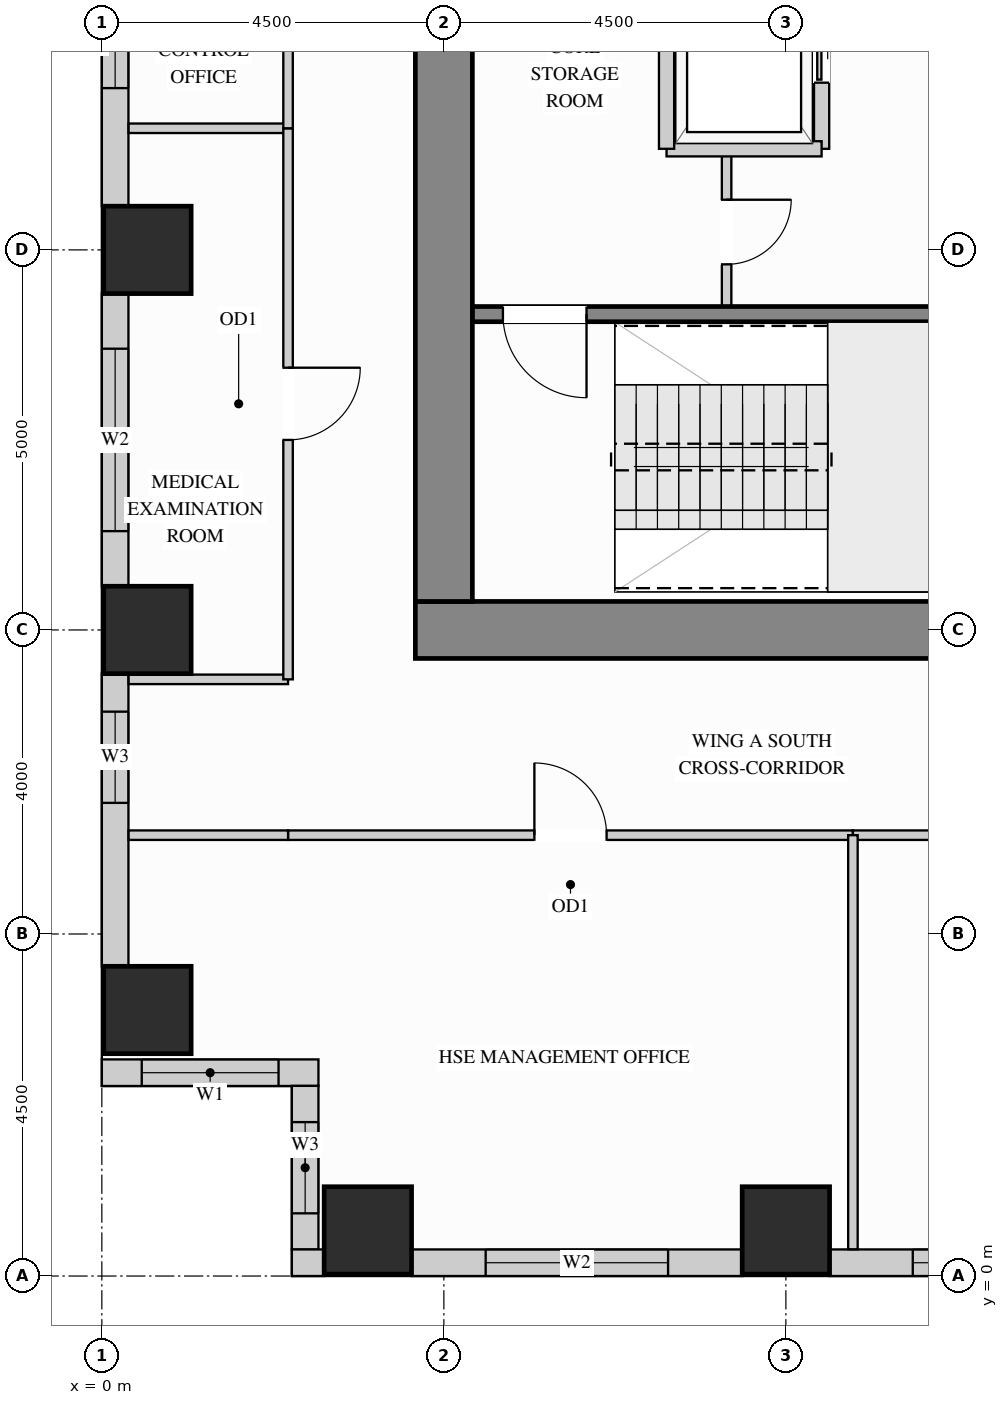
"""IFC4 building model, lengths in metres.
Left out: names, types, materials, properties, quantities, classifications, styles, units other than length and angle.
Written with IfcOpenShell. Run it as: python <this file> out.ifc"""

import sys

from ifc_helpers import new_model, si_unit, direction, frame, frame_2d, origin, origin_2d, place, context, subcontext, project, spatial, rectangle, extrude, source, transform, mapped, element, fill, save


model = new_model("IFC4")
c1 = context("Model", 3, precision=1e-05, world=origin(), true_north=direction((0.0, 1.0)))
c2 = subcontext(c1, "Body", "Model", "MODEL_VIEW")
j1 = project(units=[si_unit("LENGTHUNIT", "METRE"), si_unit("PLANEANGLEUNIT", "RADIAN")], contexts=[c1])
p1 = place(None, origin())
s1 = spatial("IfcSite", under=j1, at=p1, CompositionType="ELEMENT")
p2 = place(p1, origin())
s2 = spatial("IfcBuilding", under=s1, at=p2, CompositionType="ELEMENT")
p3 = place(p2, frame((0.0, 0.0, 117.0)))
s3 = spatial("IfcBuildingStorey", under=s2, at=p3, CompositionType="ELEMENT", Elevation=117.0)
m1 = source(origin(), c2, "Body", "SweptSolid", [
    extrude(rectangle(XDim=1.15, YDim=1.15, at=origin_2d()), origin(), (0.0, 0.0, 1.0), 3.38),
])
for number, where, z_axis, x_axis in (
    (1, (3.5, 0.6, 0.0), (0.0, 0.0, 1.0), (1.0, 0.0, 0.0)),
    (2, (9.0, 0.6, 0.0), (0.0, 0.0, 1.0), (1.0, 0.0, 0.0)),
    (3, (0.6, 13.5, 0.0), (0.0, 0.0, 1.0), (1.0, 0.0, 0.0)),
    (4, (0.6, 3.5, 0.0), (0.0, 0.0, 1.0), (1.0, 0.0, 0.0)),
    (5, (0.6, 8.5, 0.0), (0.0, 0.0, 1.0), (1.0, 0.0, 0.0)),
):
    element("IfcColumn", number, at=place(p3, frame(where, z_axis=z_axis, x_axis=x_axis)), inside=s3, PredefinedType="COLUMN", context=c2, shape_type="MappedRepresentation", body=[
        mapped(m1, transform((0.0, 0.0, 0.0), x_axis=(1.0, 0.0, 0.0), y_axis=(0.0, 1.0, 0.0), z_axis=(0.0, 0.0, 1.0))),
    ])
m2 = source(origin(), c2, "Body", "SweptSolid", [
    extrude(rectangle(XDim=10.75, YDim=0.75, at=frame_2d((5.375, 0.0))), origin(), (0.0, 0.0, 1.0), 3.38),
])
p4 = place(p3, frame((4.125, 8.5, 0.0), z_axis=(0.0, 0.0, 1.0), x_axis=(1.0, 0.0, 0.0)))
e6 = element("IfcWall", 6, at=p4, inside=s3, PredefinedType="SHEAR", context=c2, shape_type="MappedRepresentation", body=[
    mapped(m2, transform((0.0, 0.0, 0.0), x_axis=(1.0, 0.0, 0.0), y_axis=(0.0, 1.0, 0.0), z_axis=(0.0, 0.0, 1.0))),
])
m3 = source(origin(), c2, "Body", "SweptSolid", [
    extrude(rectangle(XDim=20.25, YDim=0.75, at=frame_2d((10.125, 0.0))), origin(), (0.0, 0.0, 1.0), 3.38),
])
p5 = place(p3, frame((4.5, 8.875, 0.0), z_axis=(0.0, 0.0, 1.0), x_axis=(0.0, 1.0, 0.0)))
e7 = element("IfcWall", 7, at=p5, inside=s3, PredefinedType="SHEAR", context=c2, shape_type="MappedRepresentation", body=[
    mapped(m3, transform((0.0, 0.0, 0.0), x_axis=(1.0, 0.0, 0.0), y_axis=(0.0, 1.0, 0.0), z_axis=(0.0, 0.0, 1.0))),
])
p6 = place(p3, frame((0.175, 17.427, 0.0), z_axis=(0.0, 0.0, 1.0), x_axis=(0.0, -1.0, 0.0)))
e8 = element("IfcWall", 8, at=p6, inside=s3, PredefinedType="SOLIDWALL", context=c2, shape_type="SweptSolid", body=[
    extrude(rectangle(XDim=3.354, YDim=0.35, at=frame_2d((1.677, 0.0))), origin(), (0.0, 0.0, 1.0), 3.365),
])
p7 = place(p6, frame((0.598, 0.0, 0.78)))
e9 = element("IfcOpeningElement", 9, at=p7, cuts=e8, PredefinedType="OPENING", context=c2, shape_type="SweptSolid", body=[
    extrude(rectangle(XDim=1.2, YDim=2.1, at=frame_2d((0.6, 1.05))), frame((0.0, 0.185, 0.0), z_axis=(0.0, -1.0, 0.0), x_axis=(1.0, 0.0, 0.0)), (0.0, 0.0, 1.0), 0.37),
])
p8 = place(p3, frame((0.175, 12.927, 0.0), z_axis=(0.0, 0.0, 1.0), x_axis=(0.0, -1.0, 0.0)))
e10 = element("IfcWall", 10, at=p8, inside=s3, PredefinedType="SOLIDWALL", context=c2, shape_type="SweptSolid", body=[
    extrude(rectangle(XDim=3.854, YDim=0.35, at=frame_2d((1.927, 0.0))), origin(), (0.0, 0.0, 1.0), 3.365),
])
p9 = place(p8, frame((0.727, 0.0, 0.78)))
e11 = element("IfcOpeningElement", 11, at=p9, cuts=e10, PredefinedType="OPENING", context=c2, shape_type="SweptSolid", body=[
    extrude(rectangle(XDim=2.4, YDim=2.1, at=frame_2d((1.2, 1.05))), frame((0.0, 0.185, 0.0), z_axis=(0.0, -1.0, 0.0), x_axis=(1.0, 0.0, 0.0)), (0.0, 0.0, 1.0), 0.37),
])
p10 = place(p3, frame((0.175, 7.927, 0.0), z_axis=(0.0, 0.0, 1.0), x_axis=(0.0, -1.0, 0.0)))
e12 = element("IfcWall", 12, at=p10, inside=s3, PredefinedType="SOLIDWALL", context=c2, shape_type="SweptSolid", body=[
    extrude(rectangle(XDim=3.854, YDim=0.35, at=frame_2d((1.927, 0.0))), origin(), (0.0, 0.0, 1.0), 3.365),
])
p11 = place(p10, frame((0.502, 0.0, 0.78)))
e13 = element("IfcOpeningElement", 13, at=p11, cuts=e12, PredefinedType="OPENING", context=c2, shape_type="SweptSolid", body=[
    extrude(rectangle(XDim=1.2, YDim=2.1, at=frame_2d((0.6, 1.05))), frame((0.0, 0.185, 0.0), z_axis=(0.0, -1.0, 0.0), x_axis=(1.0, 0.0, 0.0)), (0.0, 0.0, 1.0), 0.37),
])
p12 = place(p3, frame((0.0, 2.675, 0.0), z_axis=(0.0, 0.0, 1.0), x_axis=(1.0, 0.0, 0.0)))
e14 = element("IfcWall", 14, at=p12, inside=s3, PredefinedType="SOLIDWALL", context=c2, shape_type="SweptSolid", body=[
    extrude(rectangle(XDim=2.85, YDim=0.35, at=frame_2d((1.425, 0.0))), origin(), (0.0, 0.0, 1.0), 3.365),
])
p13 = place(p12, frame((0.525, 0.0, 0.78)))
e15 = element("IfcOpeningElement", 15, at=p13, cuts=e14, PredefinedType="OPENING", context=c2, shape_type="SweptSolid", body=[
    extrude(rectangle(XDim=1.8, YDim=2.1, at=frame_2d((0.9, 1.05))), frame((0.0, 0.185, 0.0), z_axis=(0.0, -1.0, 0.0), x_axis=(1.0, 0.0, 0.0)), (0.0, 0.0, 1.0), 0.37),
])
p14 = place(p3, frame((2.675, 2.502, 0.0), z_axis=(0.0, 0.0, 1.0), x_axis=(0.0, -1.0, 0.0)))
e16 = element("IfcWall", 16, at=p14, inside=s3, PredefinedType="SOLIDWALL", context=c2, shape_type="SweptSolid", body=[
    extrude(rectangle(XDim=2.154, YDim=0.35, at=frame_2d((1.077, 0.0))), origin(), (0.0, 0.0, 1.0), 3.365),
])
p15 = place(p14, frame((0.477, 0.0, 0.78)))
e17 = element("IfcOpeningElement", 17, at=p15, cuts=e16, PredefinedType="OPENING", context=c2, shape_type="SweptSolid", body=[
    extrude(rectangle(XDim=1.2, YDim=2.1, at=frame_2d((0.6, 1.05))), frame((0.0, 0.185, 0.0), z_axis=(0.0, -1.0, 0.0), x_axis=(1.0, 0.0, 0.0)), (0.0, 0.0, 1.0), 0.37),
])
m4 = source(origin(), c2, "Body", "SweptSolid", [
    extrude(rectangle(XDim=0.427, YDim=0.35, at=frame_2d((0.213, 0.0))), origin(), (0.0, 0.0, 1.0), 3.365),
])
p16 = place(p3, frame((2.5, 0.175, 0.0), z_axis=(0.0, 0.0, 1.0), x_axis=(1.0, 0.0, 0.0)))
e18 = element("IfcWall", 18, at=p16, inside=s3, PredefinedType="SOLIDWALL", context=c2, shape_type="MappedRepresentation", body=[
    mapped(m4, transform((0.0, 0.0, 0.0), x_axis=(1.0, 0.0, 0.0), y_axis=(0.0, 1.0, 0.0), z_axis=(0.0, 0.0, 1.0))),
])
p17 = place(p3, frame((4.073, 0.175, 0.0), z_axis=(0.0, 0.0, 1.0), x_axis=(1.0, 0.0, 0.0)))
e19 = element("IfcWall", 19, at=p17, inside=s3, PredefinedType="SOLIDWALL", context=c2, shape_type="SweptSolid", body=[
    extrude(rectangle(XDim=4.354, YDim=0.35, at=frame_2d((2.177, 0.0))), origin(), (0.0, 0.0, 1.0), 3.365),
])
p18 = place(p17, frame((0.977, 0.0, 0.78)))
e20 = element("IfcOpeningElement", 20, at=p18, cuts=e19, PredefinedType="OPENING", context=c2, shape_type="SweptSolid", body=[
    extrude(rectangle(XDim=2.4, YDim=2.1, at=frame_2d((1.2, 1.05))), frame((0.0, 0.185, 0.0), z_axis=(0.0, -1.0, 0.0), x_axis=(1.0, 0.0, 0.0)), (0.0, 0.0, 1.0), 0.37),
])
p19 = place(p3, frame((9.573, 0.175, 0.0), z_axis=(0.0, 0.0, 1.0), x_axis=(1.0, 0.0, 0.0)))
e21 = element("IfcWall", 21, at=p19, inside=s3, PredefinedType="SOLIDWALL", context=c2, shape_type="SweptSolid", body=[
    extrude(rectangle(XDim=4.354, YDim=0.35, at=frame_2d((2.177, 0.0))), origin(), (0.0, 0.0, 1.0), 3.365),
])
p20 = place(p19, frame((1.096, 0.0, 0.78)))
e22 = element("IfcOpeningElement", 22, at=p20, cuts=e21, PredefinedType="OPENING", context=c2, shape_type="SweptSolid", body=[
    extrude(rectangle(XDim=2.4, YDim=2.1, at=frame_2d((1.2, 1.05))), frame((0.0, 0.185, 0.0), z_axis=(0.0, -1.0, 0.0), x_axis=(1.0, 0.0, 0.0)), (0.0, 0.0, 1.0), 0.37),
])
p21 = place(p3, frame((8.22, 12.75, 0.0), z_axis=(0.0, 0.0, 1.0), x_axis=(0.0, 1.0, 0.0)))
e23 = element("IfcWall", 23, at=p21, inside=s3, PredefinedType="PARTITIONING", context=c2, shape_type="SweptSolid", body=[
    extrude(rectangle(XDim=2.07, YDim=0.125, at=frame_2d((1.035, 0.0))), origin(), (0.0, 0.0, 1.0), 3.365),
])
p22 = place(p21, frame((0.56, 0.0, 0.0)))
e24 = element("IfcOpeningElement", 24, at=p22, cuts=e23, PredefinedType="OPENING", context=c2, shape_type="SweptSolid", body=[
    extrude(rectangle(XDim=0.85, YDim=2.1, at=frame_2d((0.425, 1.05))), frame((0.0, 0.073, 0.0), z_axis=(0.0, -1.0, 0.0), x_axis=(1.0, 0.0, 0.0)), (0.0, 0.0, 1.0), 0.145),
])
m5 = source(origin(), c2, "Body", "SweptSolid", [
    extrude(rectangle(XDim=2.098, YDim=0.125, at=frame_2d((1.049, 0.0))), origin(), (0.0, 0.0, 1.0), 3.365),
])
p23 = place(p3, frame((0.352, 7.85, 0.0), z_axis=(0.0, 0.0, 1.0), x_axis=(1.0, 0.0, 0.0)))
e25 = element("IfcWall", 25, at=p23, inside=s3, PredefinedType="PARTITIONING", context=c2, shape_type="MappedRepresentation", body=[
    mapped(m5, transform((0.0, 0.0, 0.0), x_axis=(1.0, 0.0, 0.0), y_axis=(0.0, 1.0, 0.0), z_axis=(0.0, 0.0, 1.0))),
])
p24 = place(p3, frame((2.45, 5.8, 0.0), z_axis=(0.0, 0.0, 1.0), x_axis=(1.0, 0.0, 0.0)))
e26 = element("IfcWall", 26, at=p24, inside=s3, PredefinedType="PARTITIONING", context=c2, shape_type="SweptSolid", body=[
    extrude(rectangle(XDim=7.432, YDim=0.125, at=frame_2d((3.716, 0.0))), origin(), (0.0, 0.0, 1.0), 3.365),
])
p25 = place(p24, frame((3.241, 0.0, 0.0)))
e27 = element("IfcOpeningElement", 27, at=p25, cuts=e26, PredefinedType="OPENING", context=c2, shape_type="SweptSolid", body=[
    extrude(rectangle(XDim=0.95, YDim=2.15, at=frame_2d((0.475, 1.075))), frame((0.0, 0.073, 0.0), z_axis=(0.0, -1.0, 0.0), x_axis=(1.0, 0.0, 0.0)), (0.0, 0.0, 1.0), 0.145),
])
p26 = place(p3, frame((9.882, 5.8, 0.0), z_axis=(0.0, 0.0, 1.0), x_axis=(1.0, 0.0, 0.0)))
e28 = element("IfcWall", 28, at=p26, inside=s3, PredefinedType="PARTITIONING", context=c2, shape_type="SweptSolid", body=[
    extrude(rectangle(XDim=6.668, YDim=0.125, at=frame_2d((3.334, 0.0))), origin(), (0.0, 0.0, 1.0), 3.365),
])
p27 = place(p26, frame((2.859, 0.0, 0.0)))
e29 = element("IfcOpeningElement", 29, at=p27, cuts=e28, PredefinedType="OPENING", context=c2, shape_type="SweptSolid", body=[
    extrude(rectangle(XDim=0.95, YDim=2.15, at=frame_2d((0.475, 1.075))), frame((0.0, 0.073, 0.0), z_axis=(0.0, -1.0, 0.0), x_axis=(1.0, 0.0, 0.0)), (0.0, 0.0, 1.0), 0.145),
])
p28 = place(p3, frame((0.352, 5.8, 0.0), z_axis=(0.0, 0.0, 1.0), x_axis=(1.0, 0.0, 0.0)))
e30 = element("IfcWall", 30, at=p28, inside=s3, PredefinedType="PARTITIONING", context=c2, shape_type="MappedRepresentation", body=[
    mapped(m5, transform((0.0, 0.0, 0.0), x_axis=(1.0, 0.0, 0.0), y_axis=(0.0, 1.0, 0.0), z_axis=(0.0, 0.0, 1.0))),
])
m6 = source(origin(), c2, "Body", "SweptSolid", [
    extrude(rectangle(XDim=5.448, YDim=0.125, at=frame_2d((2.724, 0.0))), origin(), (0.0, 0.0, 1.0), 3.365),
])
p29 = place(p3, frame((9.882, 0.352, 0.0), z_axis=(0.0, 0.0, 1.0), x_axis=(0.0, 1.0, 0.0)))
e31 = element("IfcWall", 31, at=p29, inside=s3, PredefinedType="PARTITIONING", context=c2, shape_type="MappedRepresentation", body=[
    mapped(m6, transform((0.0, 0.0, 0.0), x_axis=(1.0, 0.0, 0.0), y_axis=(0.0, 1.0, 0.0), z_axis=(0.0, 0.0, 1.0))),
])
p30 = place(p3, frame((0.352, 15.1, 0.0), z_axis=(0.0, 0.0, 1.0), x_axis=(1.0, 0.0, 0.0)))
e32 = element("IfcWall", 32, at=p30, inside=s3, PredefinedType="PARTITIONING", context=c2, shape_type="MappedRepresentation", body=[
    mapped(m5, transform((0.0, 0.0, 0.0), x_axis=(1.0, 0.0, 0.0), y_axis=(0.0, 1.0, 0.0), z_axis=(0.0, 0.0, 1.0))),
])
p31 = place(p3, frame((2.45, 7.85, 0.0), z_axis=(0.0, 0.0, 1.0), x_axis=(0.0, 1.0, 0.0)))
e33 = element("IfcWall", 33, at=p31, inside=s3, PredefinedType="PARTITIONING", context=c2, shape_type="SweptSolid", body=[
    extrude(rectangle(XDim=7.25, YDim=0.125, at=frame_2d((3.625, 0.0))), origin(), (0.0, 0.0, 1.0), 3.365),
])
p32 = place(p31, frame((3.15, 0.0, 0.0)))
e34 = element("IfcOpeningElement", 34, at=p32, cuts=e33, PredefinedType="OPENING", context=c2, shape_type="SweptSolid", body=[
    extrude(rectangle(XDim=0.95, YDim=2.15, at=frame_2d((0.475, 1.075))), frame((0.0, 0.073, 0.0), z_axis=(0.0, -1.0, 0.0), x_axis=(1.0, 0.0, 0.0)), (0.0, 0.0, 1.0), 0.145),
])
p33 = place(p3, frame((2.45, 15.1, 0.0), z_axis=(0.0, 0.0, 1.0), x_axis=(0.0, 1.0, 0.0)))
e35 = element("IfcWall", 35, at=p33, inside=s3, PredefinedType="PARTITIONING", context=c2, shape_type="SweptSolid", body=[
    extrude(rectangle(XDim=7.5, YDim=0.125, at=frame_2d((3.75, 0.0))), origin(), (0.0, 0.0, 1.0), 3.365),
])
p34 = place(p33, frame((3.275, 0.0, 0.0)))
e36 = element("IfcOpeningElement", 36, at=p34, cuts=e35, PredefinedType="OPENING", context=c2, shape_type="SweptSolid", body=[
    extrude(rectangle(XDim=0.95, YDim=2.15, at=frame_2d((0.475, 1.075))), frame((0.0, 0.073, 0.0), z_axis=(0.0, -1.0, 0.0), x_axis=(1.0, 0.0, 0.0)), (0.0, 0.0, 1.0), 0.145),
])
p35 = place(p3, frame((9.47, 14.83, 0.0), z_axis=(0.0, 0.0, 1.0), x_axis=(0.0, 1.0, 0.0)))
e37 = element("IfcWall", 37, at=p35, inside=s3, PredefinedType="PARTITIONING", context=c2, shape_type="SweptSolid", body=[
    extrude(rectangle(XDim=2.84, YDim=0.2, at=frame_2d((1.42, 0.0))), origin(), (0.0, 0.0, 1.0), 3.365),
])
p36 = place(p35, frame((0.87, 0.0, 0.0)))
e38 = element("IfcOpeningElement", 38, at=p36, cuts=e37, PredefinedType="OPENING", context=c2, shape_type="SweptSolid", body=[
    extrude(rectangle(XDim=1.1, YDim=2.2, at=frame_2d((0.55, 1.1))), frame((0.0, 0.11, 0.0), z_axis=(0.0, -1.0, 0.0), x_axis=(1.0, 0.0, 0.0)), (0.0, 0.0, 1.0), 0.22),
])
m7 = source(origin(), c2, "Body", "SweptSolid", [
    extrude(rectangle(XDim=2.04, YDim=0.2, at=frame_2d((1.02, 0.0))), origin(), (0.0, 0.0, 1.0), 3.365),
])
p37 = place(p3, frame((7.43, 14.83, 0.0), z_axis=(0.0, 0.0, 1.0), x_axis=(1.0, 0.0, 0.0)))
e39 = element("IfcWall", 39, at=p37, inside=s3, PredefinedType="PARTITIONING", context=c2, shape_type="MappedRepresentation", body=[
    mapped(m7, transform((0.0, 0.0, 0.0), x_axis=(1.0, 0.0, 0.0), y_axis=(0.0, 1.0, 0.0), z_axis=(0.0, 0.0, 1.0))),
])
m8 = source(origin(), c2, "Body", "SweptSolid", [
    extrude(rectangle(XDim=2.84, YDim=0.2, at=frame_2d((1.42, 0.0))), origin(), (0.0, 0.0, 1.0), 3.365),
])
p38 = place(p3, frame((7.43, 14.83, 0.0), z_axis=(0.0, 0.0, 1.0), x_axis=(0.0, 1.0, 0.0)))
e40 = element("IfcWall", 40, at=p38, inside=s3, PredefinedType="PARTITIONING", context=c2, shape_type="MappedRepresentation", body=[
    mapped(m8, transform((0.0, 0.0, 0.0), x_axis=(1.0, 0.0, 0.0), y_axis=(0.0, 1.0, 0.0), z_axis=(0.0, 0.0, 1.0))),
])
p39 = place(p3, frame((4.877, 12.655, 0.0), z_axis=(0.0, 0.0, 1.0), x_axis=(1.0, 0.0, 0.0)))
e41 = element("IfcWall", 41, at=p39, inside=s3, PredefinedType="SHEAR", context=c2, shape_type="SweptSolid", body=[
    extrude(rectangle(XDim=7.528, YDim=0.2, at=frame_2d((3.764, 0.0))), origin(), (0.0, 0.0, 1.0), 3.38),
])
p40 = place(p39, frame((0.4, 0.0, 0.0)))
e42 = element("IfcOpeningElement", 42, at=p40, cuts=e41, PredefinedType="OPENING", context=c2, shape_type="SweptSolid", body=[
    extrude(rectangle(XDim=1.1, YDim=2.15, at=frame_2d((0.55, 1.075))), frame((0.0, 0.11, 0.0), z_axis=(0.0, -1.0, 0.0), x_axis=(1.0, 0.0, 0.0)), (0.0, 0.0, 1.0), 0.22),
])
m9 = source(origin(), c2, "Body", "SweptSolid", [
    extrude(rectangle(XDim=1.1, YDim=2.2, at=frame_2d((0.55, 1.1))), frame((0.0, 0.025, 0.0), z_axis=(0.0, -1.0, 0.0), x_axis=(1.0, 0.0, 0.0)), (0.0, 0.0, 1.0), 0.05),
])
p41 = place(p36, origin())
e43 = element("IfcDoor", 43, at=p41, inside=s3, OperationType="SLIDING_TO_LEFT", PredefinedType="DOOR", context=c2, shape_type="MappedRepresentation", body=[
    mapped(m9, transform((0.0, 0.0, 0.0), x_axis=(1.0, 0.0, 0.0), y_axis=(0.0, 1.0, 0.0), z_axis=(0.0, 0.0, 1.0))),
])
fill(e38, e43)
m10 = source(origin(), c2, "Body", "SweptSolid", [
    extrude(rectangle(XDim=0.95, YDim=2.15, at=frame_2d((0.475, 1.075))), frame((0.0, 0.025, 0.0), z_axis=(0.0, -1.0, 0.0), x_axis=(1.0, 0.0, 0.0)), (0.0, 0.0, 1.0), 0.05),
])
p42 = place(p25, origin())
e44 = element("IfcDoor", 44, at=p42, inside=s3, OperationType="SINGLE_SWING_LEFT", PredefinedType="DOOR", context=c2, shape_type="MappedRepresentation", body=[
    mapped(m10, transform((0.0, 0.0, 0.0), x_axis=(1.0, 0.0, 0.0), y_axis=(0.0, 1.0, 0.0), z_axis=(0.0, 0.0, 1.0))),
])
fill(e27, e44)
p43 = place(p32, origin())
e45 = element("IfcDoor", 45, at=p43, inside=s3, OperationType="SINGLE_SWING_RIGHT", PredefinedType="DOOR", context=c2, shape_type="MappedRepresentation", body=[
    mapped(m10, transform((0.0, 0.0, 0.0), x_axis=(1.0, 0.0, 0.0), y_axis=(0.0, 1.0, 0.0), z_axis=(0.0, 0.0, 1.0))),
])
fill(e34, e45)
m11 = source(origin(), c2, "Body", "SweptSolid", [
    extrude(rectangle(XDim=0.85, YDim=2.1, at=frame_2d((0.425, 1.05))), frame((0.0, 0.025, 0.0), z_axis=(0.0, -1.0, 0.0), x_axis=(1.0, 0.0, 0.0)), (0.0, 0.0, 1.0), 0.05),
])
p44 = place(p22, origin())
e46 = element("IfcDoor", 46, at=p44, inside=s3, OperationType="SINGLE_SWING_RIGHT", PredefinedType="DOOR", context=c2, shape_type="MappedRepresentation", body=[
    mapped(m11, transform((0.0, 0.0, 0.0), x_axis=(1.0, 0.0, 0.0), y_axis=(0.0, 1.0, 0.0), z_axis=(0.0, 0.0, 1.0))),
])
fill(e24, e46)
m12 = source(origin(), c2, "Body", "SweptSolid", [
    extrude(rectangle(XDim=1.1, YDim=2.15, at=frame_2d((0.55, 1.075))), frame((0.0, 0.025, 0.0), z_axis=(0.0, -1.0, 0.0), x_axis=(1.0, 0.0, 0.0)), (0.0, 0.0, 1.0), 0.05),
])
p45 = place(p40, origin())
e47 = element("IfcDoor", 47, at=p45, inside=s3, OperationType="SINGLE_SWING_RIGHT", PredefinedType="DOOR", context=c2, shape_type="MappedRepresentation", body=[
    mapped(m12, transform((0.0, 0.0, 0.0), x_axis=(1.0, 0.0, 0.0), y_axis=(0.0, 1.0, 0.0), z_axis=(0.0, 0.0, 1.0))),
])
fill(e42, e47)
m13 = source(origin(), c2, "Body", "SweptSolid", [
    extrude(rectangle(XDim=1.8, YDim=2.1, at=frame_2d((0.9, 1.05))), frame((0.0, 0.03, 0.0), z_axis=(0.0, -1.0, 0.0), x_axis=(1.0, 0.0, 0.0)), (0.0, 0.0, 1.0), 0.06),
])
p46 = place(p13, origin())
e48 = element("IfcWindow", 48, at=p46, inside=s3, PartitioningType="SINGLE_PANEL", PredefinedType="WINDOW", context=c2, shape_type="MappedRepresentation", body=[
    mapped(m13, transform((0.0, 0.0, 0.0), x_axis=(1.0, 0.0, 0.0), y_axis=(0.0, 1.0, 0.0), z_axis=(0.0, 0.0, 1.0))),
])
fill(e15, e48)
m14 = source(origin(), c2, "Body", "SweptSolid", [
    extrude(rectangle(XDim=2.4, YDim=2.1, at=frame_2d((1.2, 1.05))), frame((0.0, 0.03, 0.0), z_axis=(0.0, -1.0, 0.0), x_axis=(1.0, 0.0, 0.0)), (0.0, 0.0, 1.0), 0.06),
])
p47 = place(p9, origin())
e49 = element("IfcWindow", 49, at=p47, inside=s3, PartitioningType="SINGLE_PANEL", PredefinedType="WINDOW", context=c2, shape_type="MappedRepresentation", body=[
    mapped(m14, transform((0.0, 0.0, 0.0), x_axis=(1.0, 0.0, 0.0), y_axis=(0.0, 1.0, 0.0), z_axis=(0.0, 0.0, 1.0))),
])
fill(e11, e49)
p48 = place(p18, origin())
e50 = element("IfcWindow", 50, at=p48, inside=s3, PartitioningType="SINGLE_PANEL", PredefinedType="WINDOW", context=c2, shape_type="MappedRepresentation", body=[
    mapped(m14, transform((0.0, 0.0, 0.0), x_axis=(1.0, 0.0, 0.0), y_axis=(0.0, 1.0, 0.0), z_axis=(0.0, 0.0, 1.0))),
])
fill(e20, e50)
p49 = place(p20, origin())
e51 = element("IfcWindow", 51, at=p49, inside=s3, PartitioningType="SINGLE_PANEL", PredefinedType="WINDOW", context=c2, shape_type="MappedRepresentation", body=[
    mapped(m14, transform((0.0, 0.0, 0.0), x_axis=(1.0, 0.0, 0.0), y_axis=(0.0, 1.0, 0.0), z_axis=(0.0, 0.0, 1.0))),
])
fill(e22, e51)
m15 = source(origin(), c2, "Body", "SweptSolid", [
    extrude(rectangle(XDim=1.2, YDim=2.1, at=frame_2d((0.6, 1.05))), frame((0.0, 0.03, 0.0), z_axis=(0.0, -1.0, 0.0), x_axis=(1.0, 0.0, 0.0)), (0.0, 0.0, 1.0), 0.06),
])
p50 = place(p7, origin())
e52 = element("IfcWindow", 52, at=p50, inside=s3, PartitioningType="SINGLE_PANEL", PredefinedType="WINDOW", context=c2, shape_type="MappedRepresentation", body=[
    mapped(m15, transform((0.0, 0.0, 0.0), x_axis=(1.0, 0.0, 0.0), y_axis=(0.0, 1.0, 0.0), z_axis=(0.0, 0.0, 1.0))),
])
fill(e9, e52)
p51 = place(p11, origin())
e53 = element("IfcWindow", 53, at=p51, inside=s3, PartitioningType="SINGLE_PANEL", PredefinedType="WINDOW", context=c2, shape_type="MappedRepresentation", body=[
    mapped(m15, transform((0.0, 0.0, 0.0), x_axis=(1.0, 0.0, 0.0), y_axis=(0.0, 1.0, 0.0), z_axis=(0.0, 0.0, 1.0))),
])
fill(e13, e53)
p52 = place(p15, origin())
e54 = element("IfcWindow", 54, at=p52, inside=s3, PartitioningType="SINGLE_PANEL", PredefinedType="WINDOW", context=c2, shape_type="MappedRepresentation", body=[
    mapped(m15, transform((0.0, 0.0, 0.0), x_axis=(1.0, 0.0, 0.0), y_axis=(0.0, 1.0, 0.0), z_axis=(0.0, 0.0, 1.0))),
])
fill(e17, e54)
save(model, sys.argv[1])
